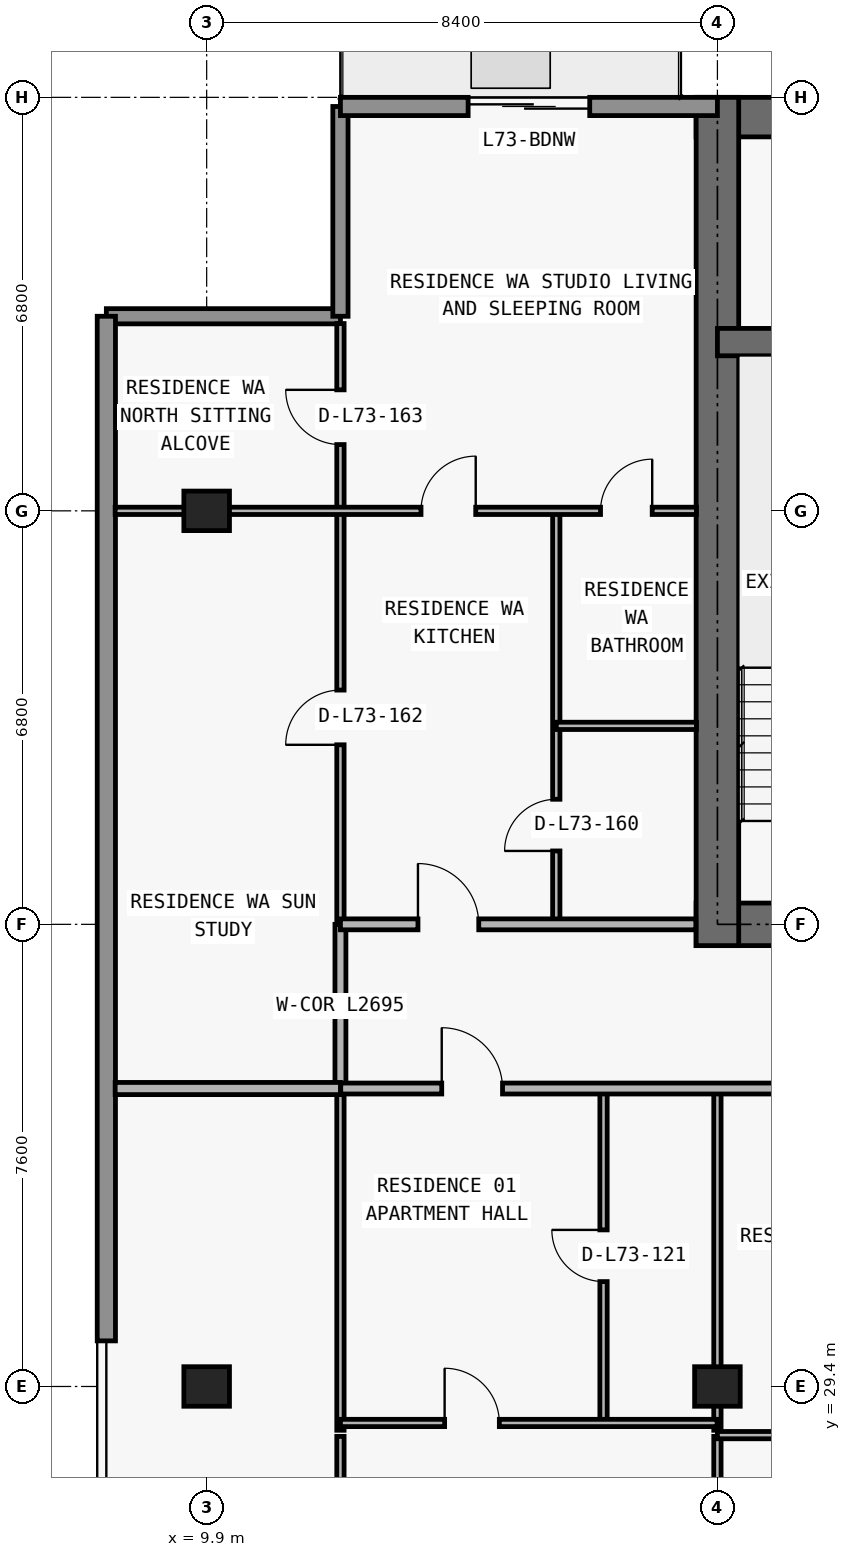
"""IFC4 building model, lengths in metres.
Left out: names, types, materials, properties, quantities, classifications, styles, units other than length and angle.
Written with IfcOpenShell. Run it as: python <this file> out.ifc"""

import sys

from ifc_helpers import new_model, si_unit, direction, frame, frame_2d, origin, origin_2d, place, context, subcontext, project, spatial, rectangle, extrude, element, fill, save


model = new_model("IFC4")
c1 = context("Model", 3, precision=1e-05, world=origin(), true_north=direction((0.0, 1.0)))
c2 = subcontext(c1, "Body", "Model", "MODEL_VIEW")
j1 = project(units=[si_unit("LENGTHUNIT", "METRE"), si_unit("PLANEANGLEUNIT", "RADIAN")], contexts=[c1])
p1 = place(None, origin())
s1 = spatial("IfcSite", under=j1, at=p1, CompositionType="ELEMENT")
p2 = place(p1, origin())
s2 = spatial("IfcBuilding", under=s1, at=p2, CompositionType="ELEMENT")
p3 = place(p2, frame((0.0, 0.0, 259.5)))
s3 = spatial("IfcBuildingStorey", under=s2, at=p3, CompositionType="ELEMENT", Elevation=259.5)
for number, where, z_axis, x_axis in (
    (1, (9.9, 29.4, 0.0), (0.0, 0.0, 1.0), (1.0, 0.0, 0.0)),
    (2, (18.3, 29.4, 0.0), (0.0, 0.0, 1.0), (1.0, 0.0, 0.0)),
    (3, (9.9, 43.8, 0.0), (0.0, 0.0, 1.0), (1.0, 0.0, 0.0)),
):
    element("IfcColumn", number, at=place(p3, frame(where, z_axis=z_axis, x_axis=x_axis)), inside=s3, PredefinedType="COLUMN", context=c2, shape_type="SweptSolid", body=[
        extrude(rectangle(XDim=0.75, YDim=0.65, at=origin_2d()), origin(), (0.0, 0.0, 1.0), 3.05),
    ])
p4 = place(p3, frame((17.95, 37.0, 0.0), z_axis=(0.0, 0.0, 1.0), x_axis=(1.0, 0.0, 0.0)))
e4 = element("IfcWall", 4, at=p4, inside=s3, PredefinedType="SHEAR", context=c2, shape_type="SweptSolid", body=[
    extrude(rectangle(XDim=41.9, YDim=0.7, at=frame_2d((20.95, 0.0))), origin(), (0.0, 0.0, 1.0), 3.05),
])
p5 = place(p4, frame((14.35, 0.0, 0.0)))
e5 = element("IfcOpeningElement", 5, at=p5, cuts=e4, PredefinedType="OPENING", context=c2, shape_type="SweptSolid", body=[
    extrude(rectangle(XDim=1.1, YDim=2.15, at=frame_2d((0.55, 1.075))), frame((0.0, 0.36, 0.0), z_axis=(0.0, -1.0, 0.0), x_axis=(1.0, 0.0, 0.0)), (0.0, 0.0, 1.0), 0.72),
])
p6 = place(p4, frame((6.2, 0.0, 0.0)))
e6 = element("IfcOpeningElement", 6, at=p6, cuts=e4, PredefinedType="OPENING", context=c2, shape_type="SweptSolid", body=[
    extrude(rectangle(XDim=1.05, YDim=2.15, at=frame_2d((0.525, 1.075))), frame((0.0, 0.36, 0.0), z_axis=(0.0, -1.0, 0.0), x_axis=(1.0, 0.0, 0.0)), (0.0, 0.0, 1.0), 0.72),
])
p7 = place(p4, frame((34.7, 0.0, 0.0)))
e7 = element("IfcOpeningElement", 7, at=p7, cuts=e4, PredefinedType="OPENING", context=c2, shape_type="SweptSolid", body=[
    extrude(rectangle(XDim=1.05, YDim=2.15, at=frame_2d((0.525, 1.075))), frame((0.0, 0.36, 0.0), z_axis=(0.0, -1.0, 0.0), x_axis=(1.0, 0.0, 0.0)), (0.0, 0.0, 1.0), 0.72),
])
p8 = place(p4, frame((10.812, 0.0, 0.0)))
e8 = element("IfcOpeningElement", 8, at=p8, cuts=e4, PredefinedType="OPENING", context=c2, shape_type="SweptSolid", body=[
    extrude(rectangle(XDim=1.05, YDim=2.15, at=frame_2d((0.525, 1.075))), frame((0.0, 0.36, 0.0), z_axis=(0.0, -1.0, 0.0), x_axis=(1.0, 0.0, 0.0)), (0.0, 0.0, 1.0), 0.72),
])
p9 = place(p4, frame((24.05, 0.0, 0.0)))
e9 = element("IfcOpeningElement", 9, at=p9, cuts=e4, PredefinedType="OPENING", context=c2, shape_type="SweptSolid", body=[
    extrude(rectangle(XDim=1.05, YDim=2.15, at=frame_2d((0.525, 1.075))), frame((0.0, 0.36, 0.0), z_axis=(0.0, -1.0, 0.0), x_axis=(1.0, 0.0, 0.0)), (0.0, 0.0, 1.0), 0.72),
])
p10 = place(p3, frame((17.95, 50.275, 0.0), z_axis=(0.0, 0.0, 1.0), x_axis=(1.0, 0.0, 0.0)))
e10 = element("IfcWall", 10, at=p10, inside=s3, PredefinedType="SHEAR", context=c2, shape_type="SweptSolid", body=[
    extrude(rectangle(XDim=41.9, YDim=0.65, at=frame_2d((20.95, 0.0))), origin(), (0.0, 0.0, 1.0), 3.05),
])
p11 = place(p3, frame((18.3, 36.65, 0.0), z_axis=(0.0, 0.0, 1.0), x_axis=(0.0, 1.0, 0.0)))
e11 = element("IfcWall", 11, at=p11, inside=s3, PredefinedType="SHEAR", context=c2, shape_type="SweptSolid", body=[
    extrude(rectangle(XDim=13.95, YDim=0.7, at=frame_2d((6.975, 0.0))), origin(), (0.0, 0.0, 1.0), 3.05),
])
p12 = place(p3, frame((18.3, 46.575, 0.0), z_axis=(0.0, 0.0, 1.0), x_axis=(1.0, 0.0, 0.0)))
e12 = element("IfcWall", 12, at=p12, inside=s3, PredefinedType="SHEAR", context=c2, shape_type="SweptSolid", body=[
    extrude(rectangle(XDim=41.2, YDim=0.45, at=frame_2d((20.6, 0.0))), origin(), (0.0, 0.0, 1.0), 3.05),
])
p13 = place(p12, frame((7.575, 0.0, 0.0)))
e13 = element("IfcOpeningElement", 13, at=p13, cuts=e12, PredefinedType="OPENING", context=c2, shape_type="SweptSolid", body=[
    extrude(rectangle(XDim=1.05, YDim=2.15, at=frame_2d((0.525, 1.075))), frame((0.0, 0.235, 0.0), z_axis=(0.0, -1.0, 0.0), x_axis=(1.0, 0.0, 0.0)), (0.0, 0.0, 1.0), 0.47),
])
p14 = place(p12, frame((32.625, 0.0, 0.0)))
e14 = element("IfcOpeningElement", 14, at=p14, cuts=e12, PredefinedType="OPENING", context=c2, shape_type="SweptSolid", body=[
    extrude(rectangle(XDim=1.05, YDim=2.15, at=frame_2d((0.525, 1.075))), frame((0.0, 0.235, 0.0), z_axis=(0.0, -1.0, 0.0), x_axis=(1.0, 0.0, 0.0)), (0.0, 0.0, 1.0), 0.47),
])
p15 = place(p3, frame((8.25, 47.0, 0.0), z_axis=(0.0, 0.0, 1.0), x_axis=(1.0, 0.0, 0.0)))
e15 = element("IfcWall", 15, at=p15, inside=s3, PredefinedType="ELEMENTEDWALL", context=c2, shape_type="SweptSolid", body=[
    extrude(rectangle(XDim=3.85, YDim=0.25, at=frame_2d((1.925, 0.0))), origin(), (0.0, 0.0, 1.0), 3.05),
])
p16 = place(p3, frame((12.1, 47.0, 0.0), z_axis=(0.0, 0.0, 1.0), x_axis=(0.0, 1.0, 0.0)))
e16 = element("IfcWall", 16, at=p16, inside=s3, PredefinedType="ELEMENTEDWALL", context=c2, shape_type="SweptSolid", body=[
    extrude(rectangle(XDim=3.45, YDim=0.25, at=frame_2d((1.725, 0.0))), origin(), (0.0, 0.0, 1.0), 3.05),
])
p17 = place(p3, frame((8.25, 30.15, 0.0), z_axis=(0.0, 0.0, 1.0), x_axis=(0.0, 1.0, 0.0)))
e17 = element("IfcWall", 17, at=p17, inside=s3, PredefinedType="STANDARD", context=c2, shape_type="SweptSolid", body=[
    extrude(rectangle(XDim=16.85, YDim=0.3, at=frame_2d((8.425, 0.0))), origin(), (0.0, 0.0, 1.0), 3.05),
])
p18 = place(p3, frame((12.1, 50.45, 0.0), z_axis=(0.0, 0.0, 1.0), x_axis=(1.0, 0.0, 0.0)))
e18 = element("IfcWall", 18, at=p18, inside=s3, PredefinedType="STANDARD", context=c2, shape_type="SweptSolid", body=[
    extrude(rectangle(XDim=6.2, YDim=0.3, at=frame_2d((3.1, 0.0))), origin(), (0.0, 0.0, 1.0), 3.05),
])
p19 = place(p18, frame((2.1, 0.0, 0.0)))
e19 = element("IfcOpeningElement", 19, at=p19, cuts=e18, PredefinedType="OPENING", context=c2, shape_type="SweptSolid", body=[
    extrude(rectangle(XDim=2.0, YDim=2.3, at=frame_2d((1.0, 1.15))), frame((0.0, 0.16, 0.0), z_axis=(0.0, -1.0, 0.0), x_axis=(1.0, 0.0, 0.0)), (0.0, 0.0, 1.0), 0.32),
])
p20 = place(p3, frame((12.1, 24.0, 0.0), z_axis=(0.0, 0.0, 1.0), x_axis=(0.0, 1.0, 0.0)))
e20 = element("IfcWall", 20, at=p20, inside=s3, PredefinedType="PARTITIONING", context=c2, shape_type="SweptSolid", body=[
    extrude(rectangle(XDim=4.58, YDim=0.12, at=frame_2d((2.29, 0.0))), origin(), (0.0, 0.0, 1.0), 2.725),
])
p21 = place(p20, frame((1.84, 0.0, 0.0)))
e21 = element("IfcOpeningElement", 21, at=p21, cuts=e20, PredefinedType="OPENING", context=c2, shape_type="SweptSolid", body=[
    extrude(rectangle(XDim=0.9, YDim=2.15, at=frame_2d((0.45, 1.075))), frame((0.0, 0.07, 0.0), z_axis=(0.0, -1.0, 0.0), x_axis=(1.0, 0.0, 0.0)), (0.0, 0.0, 1.0), 0.14),
])
p22 = place(p3, frame((12.1, 28.68, 0.0), z_axis=(0.0, 0.0, 1.0), x_axis=(0.0, 1.0, 0.0)))
e22 = element("IfcWall", 22, at=p22, inside=s3, PredefinedType="PARTITIONING", context=c2, shape_type="SweptSolid", body=[
    extrude(rectangle(XDim=5.62, YDim=0.12, at=frame_2d((2.81, 0.0))), origin(), (0.0, 0.0, 1.0), 2.725),
])
p23 = place(p3, frame((12.1, 34.305, 0.0), z_axis=(0.0, 0.0, 1.0), x_axis=(0.0, 1.0, 0.0)))
e23 = element("IfcWall", 23, at=p23, inside=s3, PredefinedType="PARTITIONING", context=c2, shape_type="SweptSolid", body=[
    extrude(rectangle(XDim=2.695, YDim=0.18, at=frame_2d((1.348, 0.0))), origin(), (0.0, 0.0, 1.0), 2.725),
])
p24 = place(p3, frame((12.1, 37.005, 0.0), z_axis=(0.0, 0.0, 1.0), x_axis=(0.0, 1.0, 0.0)))
e24 = element("IfcWall", 24, at=p24, inside=s3, PredefinedType="PARTITIONING", context=c2, shape_type="SweptSolid", body=[
    extrude(rectangle(XDim=9.875, YDim=0.12, at=frame_2d((4.938, 0.0))), origin(), (0.0, 0.0, 1.0), 2.725),
])
p25 = place(p24, frame((2.948, 0.0, 0.0)))
e25 = element("IfcOpeningElement", 25, at=p25, cuts=e24, PredefinedType="OPENING", context=c2, shape_type="SweptSolid", body=[
    extrude(rectangle(XDim=0.9, YDim=2.15, at=frame_2d((0.45, 1.075))), frame((0.0, 0.07, 0.0), z_axis=(0.0, -1.0, 0.0), x_axis=(1.0, 0.0, 0.0)), (0.0, 0.0, 1.0), 0.14),
])
p26 = place(p24, frame((7.885, 0.0, 0.0)))
e26 = element("IfcOpeningElement", 26, at=p26, cuts=e24, PredefinedType="OPENING", context=c2, shape_type="SweptSolid", body=[
    extrude(rectangle(XDim=0.9, YDim=2.15, at=frame_2d((0.45, 1.075))), frame((0.0, 0.07, 0.0), z_axis=(0.0, -1.0, 0.0), x_axis=(1.0, 0.0, 0.0)), (0.0, 0.0, 1.0), 0.14),
])
p27 = place(p3, frame((15.65, 37.0, 0.0), z_axis=(0.0, 0.0, 1.0), x_axis=(0.0, 1.0, 0.0)))
e27 = element("IfcWall", 27, at=p27, inside=s3, PredefinedType="PARTITIONING", context=c2, shape_type="SweptSolid", body=[
    extrude(rectangle(XDim=6.8, YDim=0.12, at=frame_2d((3.4, 0.0))), origin(), (0.0, 0.0, 1.0), 3.05),
])
p28 = place(p27, frame((1.207, 0.0, 0.0)))
e28 = element("IfcOpeningElement", 28, at=p28, cuts=e27, PredefinedType="OPENING", context=c2, shape_type="SweptSolid", body=[
    extrude(rectangle(XDim=0.85, YDim=2.1, at=frame_2d((0.425, 1.05))), frame((0.0, 0.07, 0.0), z_axis=(0.0, -1.0, 0.0), x_axis=(1.0, 0.0, 0.0)), (0.0, 0.0, 1.0), 0.14),
])
p29 = place(p3, frame((16.427, 28.8, 0.0), z_axis=(0.0, 0.0, 1.0), x_axis=(0.0, 1.0, 0.0)))
e29 = element("IfcWall", 29, at=p29, inside=s3, PredefinedType="PARTITIONING", context=c2, shape_type="SweptSolid", body=[
    extrude(rectangle(XDim=5.5, YDim=0.12, at=frame_2d((2.75, 0.0))), origin(), (0.0, 0.0, 1.0), 2.629),
])
p30 = place(p29, frame((2.325, 0.0, 0.0)))
e30 = element("IfcOpeningElement", 30, at=p30, cuts=e29, PredefinedType="OPENING", context=c2, shape_type="SweptSolid", body=[
    extrude(rectangle(XDim=0.85, YDim=2.1, at=frame_2d((0.425, 1.05))), frame((0.0, 0.07, 0.0), z_axis=(0.0, -1.0, 0.0), x_axis=(1.0, 0.0, 0.0)), (0.0, 0.0, 1.0), 0.14),
])
p31 = place(p3, frame((18.3, 24.0, 0.0), z_axis=(0.0, 0.0, 1.0), x_axis=(0.0, 1.0, 0.0)))
e31 = element("IfcWall", 31, at=p31, inside=s3, PredefinedType="PARTITIONING", context=c2, shape_type="SweptSolid", body=[
    extrude(rectangle(XDim=4.58, YDim=0.12, at=frame_2d((2.29, 0.0))), origin(), (0.0, 0.0, 1.0), 2.263),
])
p32 = place(p31, frame((1.94, 0.0, 0.0)))
e32 = element("IfcOpeningElement", 32, at=p32, cuts=e31, PredefinedType="OPENING", context=c2, shape_type="SweptSolid", body=[
    extrude(rectangle(XDim=0.9, YDim=2.15, at=frame_2d((0.45, 1.075))), frame((0.0, 0.07, 0.0), z_axis=(0.0, -1.0, 0.0), x_axis=(1.0, 0.0, 0.0)), (0.0, 0.0, 1.0), 0.14),
])
p33 = place(p3, frame((18.3, 28.68, 0.0), z_axis=(0.0, 0.0, 1.0), x_axis=(0.0, 1.0, 0.0)))
e33 = element("IfcWall", 33, at=p33, inside=s3, PredefinedType="PARTITIONING", context=c2, shape_type="SweptSolid", body=[
    extrude(rectangle(XDim=5.62, YDim=0.12, at=frame_2d((2.81, 0.0))), origin(), (0.0, 0.0, 1.0), 2.263),
])
p34 = place(p3, frame((18.3, 28.6, 0.0), z_axis=(0.0, 0.0, 1.0), x_axis=(1.0, 0.0, 0.0)))
e34 = element("IfcWall", 34, at=p34, inside=s3, PredefinedType="PARTITIONING", context=c2, shape_type="SweptSolid", body=[
    extrude(rectangle(XDim=8.18, YDim=0.12, at=frame_2d((4.09, 0.0))), origin(), (0.0, 0.0, 1.0), 3.05),
])
p35 = place(p34, frame((2.908, 0.0, 0.0)))
e35 = element("IfcOpeningElement", 35, at=p35, cuts=e34, PredefinedType="OPENING", context=c2, shape_type="SweptSolid", body=[
    extrude(rectangle(XDim=0.9, YDim=2.15, at=frame_2d((0.45, 1.075))), frame((0.0, 0.07, 0.0), z_axis=(0.0, -1.0, 0.0), x_axis=(1.0, 0.0, 0.0)), (0.0, 0.0, 1.0), 0.14),
])
p36 = place(p3, frame((12.1, 28.8, 0.0), z_axis=(0.0, 0.0, 1.0), x_axis=(1.0, 0.0, 0.0)))
e36 = element("IfcWall", 36, at=p36, inside=s3, PredefinedType="PARTITIONING", context=c2, shape_type="SweptSolid", body=[
    extrude(rectangle(XDim=6.195, YDim=0.12, at=frame_2d((3.097, 0.0))), origin(), (0.0, 0.0, 1.0), 3.05),
])
p37 = place(p36, frame((1.713, 0.0, 0.0)))
e37 = element("IfcOpeningElement", 37, at=p37, cuts=e36, PredefinedType="OPENING", context=c2, shape_type="SweptSolid", body=[
    extrude(rectangle(XDim=0.9, YDim=2.15, at=frame_2d((0.45, 1.075))), frame((0.0, 0.07, 0.0), z_axis=(0.0, -1.0, 0.0), x_axis=(1.0, 0.0, 0.0)), (0.0, 0.0, 1.0), 0.14),
])
p38 = place(p3, frame((8.395, 34.3, 0.0), z_axis=(0.0, 0.0, 1.0), x_axis=(1.0, 0.0, 0.0)))
e38 = element("IfcWall", 38, at=p38, inside=s3, PredefinedType="PARTITIONING", context=c2, shape_type="SweptSolid", body=[
    extrude(rectangle(XDim=3.705, YDim=0.2, at=frame_2d((1.853, 0.0))), origin(), (0.0, 0.0, 1.0), 3.05),
])
p39 = place(p3, frame((12.105, 34.3, 0.0), z_axis=(0.0, 0.0, 1.0), x_axis=(1.0, 0.0, 0.0)))
e39 = element("IfcWall", 39, at=p39, inside=s3, PredefinedType="PARTITIONING", context=c2, shape_type="SweptSolid", body=[
    extrude(rectangle(XDim=53.595, YDim=0.18, at=frame_2d((26.797, 0.0))), origin(), (0.0, 0.0, 1.0), 3.05),
])
p40 = place(p39, frame((1.661, 0.0, 0.0)))
e40 = element("IfcOpeningElement", 40, at=p40, cuts=e39, PredefinedType="OPENING", context=c2, shape_type="SweptSolid", body=[
    extrude(rectangle(XDim=1.0, YDim=2.2, at=frame_2d((0.5, 1.1))), frame((0.0, 0.1, 0.0), z_axis=(0.0, -1.0, 0.0), x_axis=(1.0, 0.0, 0.0)), (0.0, 0.0, 1.0), 0.2),
])
p41 = place(p39, frame((17.438, 0.0, 0.0)))
e41 = element("IfcOpeningElement", 41, at=p41, cuts=e39, PredefinedType="OPENING", context=c2, shape_type="SweptSolid", body=[
    extrude(rectangle(XDim=1.0, YDim=2.2, at=frame_2d((0.5, 1.1))), frame((0.0, 0.1, 0.0), z_axis=(0.0, -1.0, 0.0), x_axis=(1.0, 0.0, 0.0)), (0.0, 0.0, 1.0), 0.2),
])
p42 = place(p39, frame((41.727, 0.0, 0.0)))
e42 = element("IfcOpeningElement", 42, at=p42, cuts=e39, PredefinedType="OPENING", context=c2, shape_type="SweptSolid", body=[
    extrude(rectangle(XDim=1.0, YDim=2.2, at=frame_2d((0.5, 1.1))), frame((0.0, 0.1, 0.0), z_axis=(0.0, -1.0, 0.0), x_axis=(1.0, 0.0, 0.0)), (0.0, 0.0, 1.0), 0.2),
])
p43 = place(p39, frame((49.141, 0.0, 0.0)))
e43 = element("IfcOpeningElement", 43, at=p43, cuts=e39, PredefinedType="OPENING", context=c2, shape_type="SweptSolid", body=[
    extrude(rectangle(XDim=1.0, YDim=2.2, at=frame_2d((0.5, 1.1))), frame((0.0, 0.1, 0.0), z_axis=(0.0, -1.0, 0.0), x_axis=(1.0, 0.0, 0.0)), (0.0, 0.0, 1.0), 0.2),
])
p44 = place(p3, frame((12.1, 37.0, 0.0), z_axis=(0.0, 0.0, 1.0), x_axis=(1.0, 0.0, 0.0)))
e44 = element("IfcWall", 44, at=p44, inside=s3, PredefinedType="PARTITIONING", context=c2, shape_type="SweptSolid", body=[
    extrude(rectangle(XDim=5.845, YDim=0.18, at=frame_2d((2.922, 0.0))), origin(), (0.0, 0.0, 1.0), 3.05),
])
p45 = place(p44, frame((1.275, 0.0, 0.0)))
e45 = element("IfcOpeningElement", 45, at=p45, cuts=e44, PredefinedType="OPENING", context=c2, shape_type="SweptSolid", body=[
    extrude(rectangle(XDim=1.0, YDim=2.2, at=frame_2d((0.5, 1.1))), frame((0.0, 0.1, 0.0), z_axis=(0.0, -1.0, 0.0), x_axis=(1.0, 0.0, 0.0)), (0.0, 0.0, 1.0), 0.2),
])
p46 = place(p3, frame((15.65, 40.264, 0.0), z_axis=(0.0, 0.0, 1.0), x_axis=(1.0, 0.0, 0.0)))
e46 = element("IfcWall", 46, at=p46, inside=s3, PredefinedType="PARTITIONING", context=c2, shape_type="SweptSolid", body=[
    extrude(rectangle(XDim=2.305, YDim=0.12, at=frame_2d((1.153, 0.0))), origin(), (0.0, 0.0, 1.0), 3.05),
])
p47 = place(p3, frame((8.395, 43.8, 0.0), z_axis=(0.0, 0.0, 1.0), x_axis=(1.0, 0.0, 0.0)))
e47 = element("IfcWall", 47, at=p47, inside=s3, PredefinedType="PARTITIONING", context=c2, shape_type="SweptSolid", body=[
    extrude(rectangle(XDim=9.56, YDim=0.12, at=frame_2d((4.78, 0.0))), origin(), (0.0, 0.0, 1.0), 2.418),
])
p48 = place(p47, frame((5.03, 0.0, 0.0)))
e48 = element("IfcOpeningElement", 48, at=p48, cuts=e47, PredefinedType="OPENING", context=c2, shape_type="SweptSolid", body=[
    extrude(rectangle(XDim=0.9, YDim=2.15, at=frame_2d((0.45, 1.075))), frame((0.0, 0.07, 0.0), z_axis=(0.0, -1.0, 0.0), x_axis=(1.0, 0.0, 0.0)), (0.0, 0.0, 1.0), 0.14),
])
p49 = place(p47, frame((7.982, 0.0, 0.0)))
e49 = element("IfcOpeningElement", 49, at=p49, cuts=e47, PredefinedType="OPENING", context=c2, shape_type="SweptSolid", body=[
    extrude(rectangle(XDim=0.85, YDim=2.1, at=frame_2d((0.425, 1.05))), frame((0.0, 0.07, 0.0), z_axis=(0.0, -1.0, 0.0), x_axis=(1.0, 0.0, 0.0)), (0.0, 0.0, 1.0), 0.14),
])
p50 = place(p19, origin())
e50 = element("IfcDoor", 50, at=p50, inside=s3, OperationType="DOUBLE_DOOR_SLIDING", PredefinedType="DOOR", context=c2, shape_type="SweptSolid", body=[
    extrude(rectangle(XDim=2.0, YDim=2.3, at=frame_2d((1.0, 1.15))), frame((0.0, 0.025, 0.0), z_axis=(0.0, -1.0, 0.0), x_axis=(1.0, 0.0, 0.0)), (0.0, 0.0, 1.0), 0.05),
])
fill(e19, e50)
p51 = place(p40, origin())
e51 = element("IfcDoor", 51, at=p51, inside=s3, OperationType="SINGLE_SWING_LEFT", PredefinedType="DOOR", context=c2, shape_type="SweptSolid", body=[
    extrude(rectangle(XDim=1.0, YDim=2.2, at=frame_2d((0.5, 1.1))), frame((0.0, 0.025, 0.0), z_axis=(0.0, -1.0, 0.0), x_axis=(1.0, 0.0, 0.0)), (0.0, 0.0, 1.0), 0.05),
])
fill(e40, e51)
p52 = place(p30, origin())
e52 = element("IfcDoor", 52, at=p52, inside=s3, OperationType="SINGLE_SWING_RIGHT", PredefinedType="DOOR", context=c2, shape_type="SweptSolid", body=[
    extrude(rectangle(XDim=0.85, YDim=2.1, at=frame_2d((0.425, 1.05))), frame((0.0, 0.025, 0.0), z_axis=(0.0, -1.0, 0.0), x_axis=(1.0, 0.0, 0.0)), (0.0, 0.0, 1.0), 0.05),
])
fill(e30, e52)
p53 = place(p37, origin())
e53 = element("IfcDoor", 53, at=p53, inside=s3, OperationType="SINGLE_SWING_LEFT", PredefinedType="DOOR", context=c2, shape_type="SweptSolid", body=[
    extrude(rectangle(XDim=0.9, YDim=2.15, at=frame_2d((0.45, 1.075))), frame((0.0, 0.025, 0.0), z_axis=(0.0, -1.0, 0.0), x_axis=(1.0, 0.0, 0.0)), (0.0, 0.0, 1.0), 0.05),
])
fill(e37, e53)
p54 = place(p45, origin())
e54 = element("IfcDoor", 54, at=p54, inside=s3, OperationType="SINGLE_SWING_LEFT", PredefinedType="DOOR", context=c2, shape_type="SweptSolid", body=[
    extrude(rectangle(XDim=1.0, YDim=2.2, at=frame_2d((0.5, 1.1))), frame((0.0, 0.025, 0.0), z_axis=(0.0, -1.0, 0.0), x_axis=(1.0, 0.0, 0.0)), (0.0, 0.0, 1.0), 0.05),
])
fill(e45, e54)
p55 = place(p48, origin())
e55 = element("IfcDoor", 55, at=p55, inside=s3, OperationType="SINGLE_SWING_RIGHT", PredefinedType="DOOR", context=c2, shape_type="SweptSolid", body=[
    extrude(rectangle(XDim=0.9, YDim=2.15, at=frame_2d((0.45, 1.075))), frame((0.0, 0.025, 0.0), z_axis=(0.0, -1.0, 0.0), x_axis=(1.0, 0.0, 0.0)), (0.0, 0.0, 1.0), 0.05),
])
fill(e48, e55)
p56 = place(p28, origin())
e56 = element("IfcDoor", 56, at=p56, inside=s3, OperationType="SINGLE_SWING_LEFT", PredefinedType="DOOR", context=c2, shape_type="SweptSolid", body=[
    extrude(rectangle(XDim=0.85, YDim=2.1, at=frame_2d((0.425, 1.05))), frame((0.0, 0.025, 0.0), z_axis=(0.0, -1.0, 0.0), x_axis=(1.0, 0.0, 0.0)), (0.0, 0.0, 1.0), 0.05),
])
fill(e28, e56)
p57 = place(p49, origin())
e57 = element("IfcDoor", 57, at=p57, inside=s3, OperationType="SINGLE_SWING_RIGHT", PredefinedType="DOOR", context=c2, shape_type="SweptSolid", body=[
    extrude(rectangle(XDim=0.85, YDim=2.1, at=frame_2d((0.425, 1.05))), frame((0.0, 0.025, 0.0), z_axis=(0.0, -1.0, 0.0), x_axis=(1.0, 0.0, 0.0)), (0.0, 0.0, 1.0), 0.05),
])
fill(e49, e57)
p58 = place(p25, origin())
e58 = element("IfcDoor", 58, at=p58, inside=s3, OperationType="SINGLE_SWING_LEFT", PredefinedType="DOOR", context=c2, shape_type="SweptSolid", body=[
    extrude(rectangle(XDim=0.9, YDim=2.15, at=frame_2d((0.45, 1.075))), frame((0.0, 0.025, 0.0), z_axis=(0.0, -1.0, 0.0), x_axis=(1.0, 0.0, 0.0)), (0.0, 0.0, 1.0), 0.05),
])
fill(e25, e58)
p59 = place(p26, origin())
e59 = element("IfcDoor", 59, at=p59, inside=s3, OperationType="SINGLE_SWING_RIGHT", PredefinedType="DOOR", context=c2, shape_type="SweptSolid", body=[
    extrude(rectangle(XDim=0.9, YDim=2.15, at=frame_2d((0.45, 1.075))), frame((0.0, 0.025, 0.0), z_axis=(0.0, -1.0, 0.0), x_axis=(1.0, 0.0, 0.0)), (0.0, 0.0, 1.0), 0.05),
])
fill(e26, e59)
save(model, sys.argv[1])
